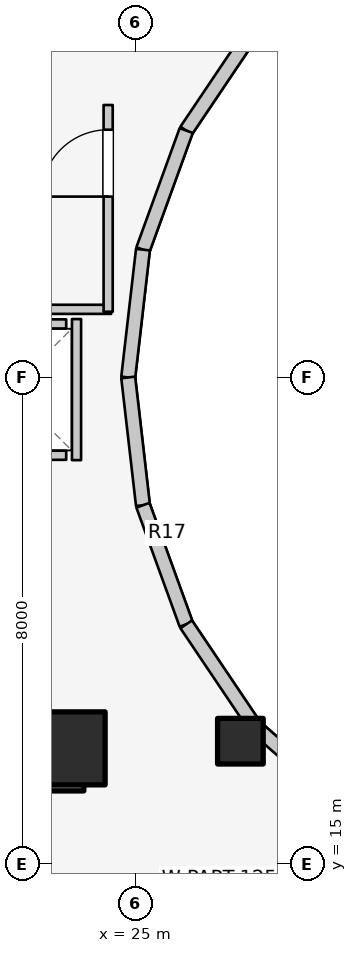
"""IFC4 building model, lengths in metres.
Left out: names, types, materials, properties, quantities, classifications, styles, units other than length and angle.
Written with IfcOpenShell. Run it as: python <this file> out.ifc"""

import sys

from ifc_helpers import new_model, si_unit, direction, frame, frame_2d, origin, origin_2d, place, context, subcontext, project, spatial, rectangle, extrude, element, fill, save


model = new_model("IFC4")
c1 = context("Model", 3, precision=1e-05, world=origin(), true_north=direction((0.0, 1.0)))
c2 = subcontext(c1, "Body", "Model", "MODEL_VIEW")
j1 = project(units=[si_unit("LENGTHUNIT", "METRE"), si_unit("PLANEANGLEUNIT", "RADIAN")], contexts=[c1])
p1 = place(None, origin())
s1 = spatial("IfcSite", under=j1, at=p1, CompositionType="ELEMENT")
p2 = place(p1, origin())
s2 = spatial("IfcBuilding", under=s1, at=p2, CompositionType="ELEMENT")
p3 = place(p2, frame((0.0, 0.0, 159.1)))
s3 = spatial("IfcBuildingStorey", under=s2, at=p3, CompositionType="ELEMENT", Elevation=159.1)
p4 = place(p3, frame((19.65, 16.55, 0.0), z_axis=(0.0, 0.0, 1.0), x_axis=(1.0, 0.0, 0.0)))
e1 = element("IfcWall", 1, at=p4, inside=s3, PredefinedType="SHEAR", context=c2, shape_type="SweptSolid", body=[
    extrude(rectangle(XDim=4.5, YDim=0.7, at=frame_2d((2.25, 0.0))), origin(), (0.0, 0.0, 1.0), 3.1),
])
p5 = place(p3, frame((23.9, 16.9, 0.0), z_axis=(0.0, 0.0, 1.0), x_axis=(1.0, 0.0, 0.0)))
e2 = element("IfcColumn", 2, at=p5, inside=s3, PredefinedType="COLUMN", context=c2, shape_type="SweptSolid", body=[
    extrude(rectangle(XDim=1.2, YDim=1.2, at=origin_2d()), origin(), (0.0, 0.0, 1.0), 3.1),
])
p6 = place(p3, frame((26.725, 17.018, 0.0), z_axis=(0.0, 0.0, 1.0), x_axis=(1.0, 0.0, 0.0)))
e3 = element("IfcColumn", 3, at=p6, inside=s3, PredefinedType="COLUMN", context=c2, shape_type="SweptSolid", body=[
    extrude(rectangle(XDim=0.75, YDim=0.75, at=origin_2d()), origin(), (0.0, 0.0, 1.0), 3.1),
])
p7 = place(p3, frame((26.965, 28.742, 0.0), z_axis=(0.0, 0.0, 1.0), x_axis=(-0.558197800898, -0.829707909492, 0.0)))
e4 = element("IfcWall", 4, at=p7, inside=s3, PredefinedType="STANDARD", context=c2, shape_type="SweptSolid", body=[
    extrude(rectangle(XDim=2.027, YDim=0.23, at=frame_2d((1.013, 0.0))), origin(), (0.0, 0.0, 1.0), 1.22),
])
p8 = place(p3, frame((25.834, 27.06, 0.0), z_axis=(0.0, 0.0, 1.0), x_axis=(-0.341423187295, -0.93990968033, 0.0)))
e5 = element("IfcWall", 5, at=p8, inside=s3, PredefinedType="STANDARD", context=c2, shape_type="SweptSolid", body=[
    extrude(rectangle(XDim=2.084, YDim=0.23, at=frame_2d((1.042, 0.0))), origin(), (0.0, 0.0, 1.0), 2.56),
])
for number, where, z_axis, x_axis in (
    (6, (25.123, 25.102, 0.0), (0.0, 0.0, 1.0), (-0.115, -0.993, 0.0)),
    (7, (24.88, 23.0, 0.0), (0.0, 0.0, 1.0), (0.115, -0.993, 0.0)),
):
    element("IfcWall", number, at=place(p3, frame(where, z_axis=z_axis, x_axis=x_axis)), inside=s3, PredefinedType="STANDARD", context=c2, shape_type="SweptSolid", body=[
        extrude(rectangle(XDim=2.115, YDim=0.23, at=frame_2d((1.058, 0.0))), origin(), (0.0, 0.0, 1.0), 2.56),
    ])
p9 = place(p3, frame((25.123, 20.898, 0.0), z_axis=(0.0, 0.0, 1.0), x_axis=(0.341423187295, -0.93990968033, 0.0)))
e8 = element("IfcWall", 8, at=p9, inside=s3, PredefinedType="STANDARD", context=c2, shape_type="SweptSolid", body=[
    extrude(rectangle(XDim=2.084, YDim=0.23, at=frame_2d((1.042, 0.0))), origin(), (0.0, 0.0, 1.0), 2.56),
])
p10 = place(p3, frame((25.834, 18.94, 0.0), z_axis=(0.0, 0.0, 1.0), x_axis=(0.558197800898, -0.829707909492, 0.0)))
e9 = element("IfcWall", 9, at=p10, inside=s3, PredefinedType="STANDARD", context=c2, shape_type="SweptSolid", body=[
    extrude(rectangle(XDim=2.027, YDim=0.23, at=frame_2d((1.013, 0.0))), origin(), (0.0, 0.0, 1.0), 1.22),
])
p11 = place(p3, frame((26.965, 17.258, 0.0), z_axis=(0.0, 0.0, 1.0), x_axis=(0.752576694707, -0.658504607869, 0.0)))
e10 = element("IfcWall", 10, at=p11, inside=s3, PredefinedType="STANDARD", context=c2, shape_type="SweptSolid", body=[
    extrude(rectangle(XDim=1.959, YDim=0.23, at=frame_2d((0.98, 0.0))), origin(), (0.0, 0.0, 1.0), 1.22),
])
for number, where, z_axis, x_axis in (
    (11, (22.04, 21.72, 0.0), (0.0, 0.0, 1.0), (1.0, 0.0, 0.0)),
    (12, (22.04, 23.88, 0.0), (0.0, 0.0, 1.0), (1.0, 0.0, 0.0)),
):
    element("IfcWall", number, at=place(p3, frame(where, z_axis=z_axis, x_axis=x_axis)), inside=s3, PredefinedType="SOLIDWALL", context=c2, shape_type="SweptSolid", body=[
        extrude(rectangle(XDim=1.82, YDim=0.15, at=frame_2d((0.91, 0.0))), origin(), (0.0, 0.0, 1.0), 2.12),
    ])
p12 = place(p3, frame((24.03, 21.64, 0.0), z_axis=(0.0, 0.0, 1.0), x_axis=(0.0, 1.0, 0.0)))
e13 = element("IfcWall", 13, at=p12, inside=s3, PredefinedType="SOLIDWALL", context=c2, shape_type="SweptSolid", body=[
    extrude(rectangle(XDim=2.32, YDim=0.15, at=frame_2d((1.16, 0.0))), origin(), (0.0, 0.0, 1.0), 2.12),
])
p13 = place(p3, frame((19.52, 24.12, 0.0), z_axis=(0.0, 0.0, 1.0), x_axis=(1.0, 0.0, 0.0)))
e14 = element("IfcWall", 14, at=p13, inside=s3, PredefinedType="PARTITIONING", context=c2, shape_type="SweptSolid", body=[
    extrude(rectangle(XDim=5.08, YDim=0.15, at=frame_2d((2.54, 0.0))), origin(), (0.0, 0.0, 1.0), 2.12),
])
p14 = place(p3, frame((24.55, 24.08, 0.0), z_axis=(0.0, 0.0, 1.0), x_axis=(0.0, 1.0, 0.0)))
e15 = element("IfcWall", 15, at=p14, inside=s3, PredefinedType="PARTITIONING", context=c2, shape_type="SweptSolid", body=[
    extrude(rectangle(XDim=3.4, YDim=0.15, at=frame_2d((1.7, 0.0))), origin(), (0.0, 0.0, 1.0), 2.575),
])
p15 = place(p14, frame((1.894, 0.0, 0.0)))
e16 = element("IfcOpeningElement", 16, at=p15, cuts=e15, PredefinedType="OPENING", context=c2, shape_type="SweptSolid", body=[
    extrude(rectangle(XDim=1.1, YDim=2.1, at=frame_2d((0.55, 1.05))), frame((0.0, 0.085, 0.0), z_axis=(0.0, -1.0, 0.0), x_axis=(1.0, 0.0, 0.0)), (0.0, 0.0, 1.0), 0.17),
])
p16 = place(p3, frame((28.45, 15.985, 0.0), z_axis=(0.0, 0.0, 1.0), x_axis=(-0.525627246902, -0.850714991824, 0.0)))
e17 = element("IfcWall", 17, at=p16, inside=s3, PredefinedType="PARTITIONING", context=c2, shape_type="SweptSolid", body=[
    extrude(rectangle(XDim=2.901, YDim=0.125, at=frame_2d((1.451, 0.0))), origin(), (0.0, 0.0, 1.0), 2.019),
])
p17 = place(p15, origin())
e18 = element("IfcDoor", 18, at=p17, inside=s3, OperationType="SINGLE_SWING_LEFT", PredefinedType="DOOR", context=c2, shape_type="SweptSolid", body=[
    extrude(rectangle(XDim=1.1, YDim=2.1, at=frame_2d((0.55, 1.05))), frame((0.0, 0.025, 0.0), z_axis=(0.0, -1.0, 0.0), x_axis=(1.0, 0.0, 0.0)), (0.0, 0.0, 1.0), 0.05),
])
fill(e16, e18)
save(model, sys.argv[1])
